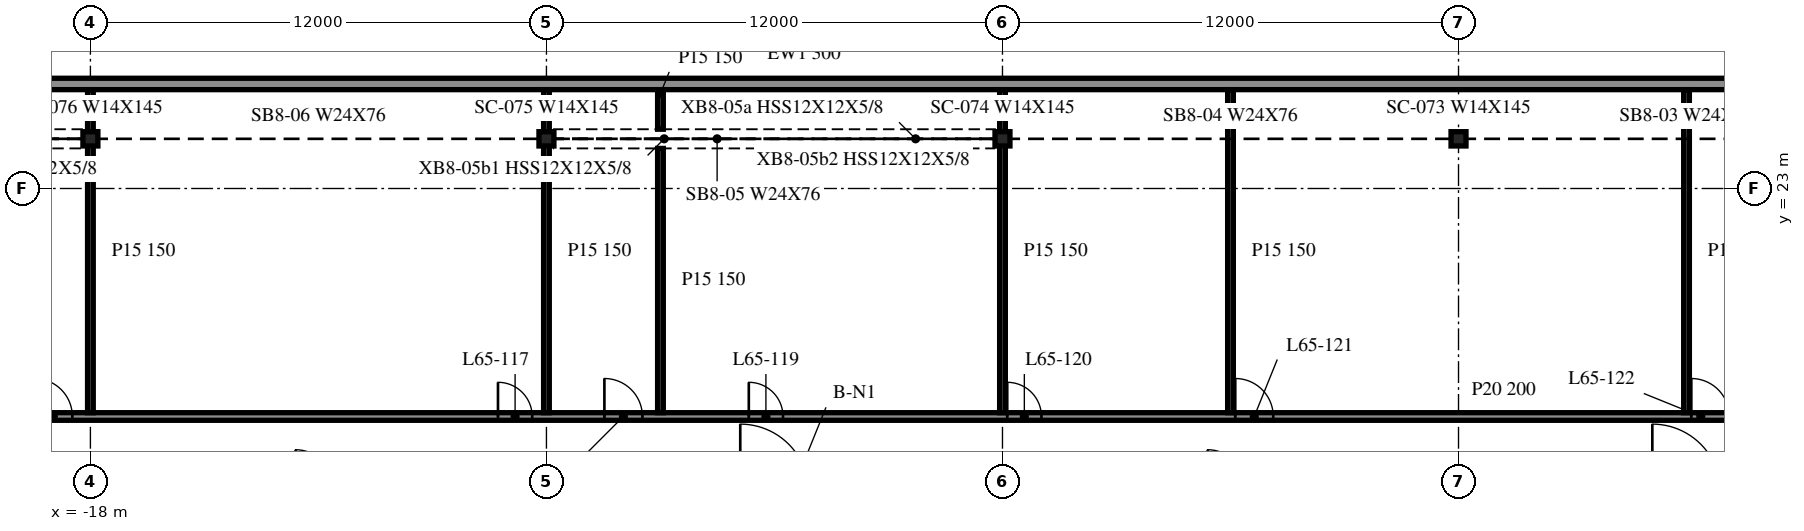
"""IFC4 building model, lengths in metres.
Left out: names, types, materials, properties, quantities, classifications, styles, units other than length and angle.
Written with IfcOpenShell. Run it as: python <this file> out.ifc"""

import sys

from ifc_helpers import new_model, si_unit, direction, frame, frame_2d, origin, origin_2d, place, context, subcontext, project, spatial, rectangle, i_section, extrude, element, fill, save


model = new_model("IFC4")
c1 = context("Model", 3, precision=1e-05, world=origin(), true_north=direction((0.0, 1.0)))
c2 = subcontext(c1, "Body", "Model", "MODEL_VIEW")
j1 = project(units=[si_unit("LENGTHUNIT", "METRE"), si_unit("PLANEANGLEUNIT", "RADIAN")], contexts=[c1])
p1 = place(None, origin())
s1 = spatial("IfcSite", under=j1, at=p1, CompositionType="ELEMENT")
p2 = place(p1, origin())
s2 = spatial("IfcBuilding", under=s1, at=p2, CompositionType="ELEMENT")
p3 = place(p2, frame((0.0, 0.0, 267.1)))
s3 = spatial("IfcBuildingStorey", under=s2, at=p3, CompositionType="ELEMENT", Elevation=267.1)
for number, where, z_axis, x_axis in (
    (1, (18.0, 24.307, -0.34), (0.0, 0.0, 1.0), (1.0, 0.0, 0.0)),
    (2, (6.0, 24.307, -0.34), (0.0, 0.0, 1.0), (1.0, 0.0, 0.0)),
    (3, (-6.0, 24.307, -0.34), (0.0, 0.0, 1.0), (1.0, 0.0, 0.0)),
    (4, (-18.0, 24.307, -0.34), (0.0, 0.0, 1.0), (1.0, 0.0, 0.0)),
):
    element("IfcColumn", number, at=place(p3, frame(where, z_axis=z_axis, x_axis=x_axis)), inside=s3, PredefinedType="COLUMN", context=c2, shape_type="SweptSolid", body=[
        extrude(i_section(OverallWidth=0.394, OverallDepth=0.376, WebThickness=0.017, FlangeThickness=0.028, at=origin_2d()), origin(), (0.0, 0.0, 1.0), 3.8),
    ])
p4 = place(p3, frame((42.0, 25.751, 0.0), z_axis=(0.0, 0.0, 1.0), x_axis=(-1.0, 0.0, 0.0)))
e5 = element("IfcWall", 5, at=p4, inside=s3, PredefinedType="NOTDEFINED", context=c2, shape_type="SweptSolid", body=[
    extrude(rectangle(XDim=84.0, YDim=0.3, at=frame_2d((42.0, 0.0))), origin(), (0.0, 0.0, 1.0), 2.853),
])
p5 = place(p3, frame((-47.975, 17.0, 0.0), z_axis=(0.0, 0.0, 1.0), x_axis=(1.0, 0.0, 0.0)))
e6 = element("IfcWall", 6, at=p5, inside=s3, PredefinedType="PARTITIONING", context=c2, shape_type="SweptSolid", body=[
    extrude(rectangle(XDim=95.95, YDim=0.2, at=frame_2d((47.975, 0.0))), origin(), (0.0, 0.0, 1.0), 3.46),
])
p6 = place(p5, frame((10.7, 0.0, 0.0)))
e7 = element("IfcOpeningElement", 7, at=p6, cuts=e6, PredefinedType="OPENING", context=c2, shape_type="SweptSolid", body=[
    extrude(rectangle(XDim=0.9, YDim=2.1, at=frame_2d((0.45, 1.05))), frame((0.0, 0.11, 0.0), z_axis=(0.0, -1.0, 0.0), x_axis=(1.0, 0.0, 0.0)), (0.0, 0.0, 1.0), 0.22),
])
p7 = place(p5, frame((13.7, 0.0, 0.0)))
e8 = element("IfcOpeningElement", 8, at=p7, cuts=e6, PredefinedType="OPENING", context=c2, shape_type="SweptSolid", body=[
    extrude(rectangle(XDim=0.9, YDim=2.1, at=frame_2d((0.45, 1.05))), frame((0.0, 0.11, 0.0), z_axis=(0.0, -1.0, 0.0), x_axis=(1.0, 0.0, 0.0)), (0.0, 0.0, 1.0), 0.22),
])
p8 = place(p5, frame((22.5, 0.0, 0.0)))
e9 = element("IfcOpeningElement", 9, at=p8, cuts=e6, PredefinedType="OPENING", context=c2, shape_type="SweptSolid", body=[
    extrude(rectangle(XDim=1.0, YDim=2.1, at=frame_2d((0.5, 1.05))), frame((0.0, 0.11, 0.0), z_axis=(0.0, -1.0, 0.0), x_axis=(1.0, 0.0, 0.0)), (0.0, 0.0, 1.0), 0.22),
])
p9 = place(p5, frame((28.5, 0.0, 0.0)))
e10 = element("IfcOpeningElement", 10, at=p9, cuts=e6, PredefinedType="OPENING", context=c2, shape_type="SweptSolid", body=[
    extrude(rectangle(XDim=1.0, YDim=2.1, at=frame_2d((0.5, 1.05))), frame((0.0, 0.11, 0.0), z_axis=(0.0, -1.0, 0.0), x_axis=(1.0, 0.0, 0.0)), (0.0, 0.0, 1.0), 0.22),
])
p10 = place(p5, frame((40.7, 0.0, 0.0)))
e11 = element("IfcOpeningElement", 11, at=p10, cuts=e6, PredefinedType="OPENING", context=c2, shape_type="SweptSolid", body=[
    extrude(rectangle(XDim=0.9, YDim=2.1, at=frame_2d((0.45, 1.05))), frame((0.0, 0.11, 0.0), z_axis=(0.0, -1.0, 0.0), x_axis=(1.0, 0.0, 0.0)), (0.0, 0.0, 1.0), 0.22),
])
p11 = place(p5, frame((43.5, 0.0, 0.0)))
e12 = element("IfcOpeningElement", 12, at=p11, cuts=e6, PredefinedType="OPENING", context=c2, shape_type="SweptSolid", body=[
    extrude(rectangle(XDim=1.0, YDim=2.1, at=frame_2d((0.5, 1.05))), frame((0.0, 0.11, 0.0), z_axis=(0.0, -1.0, 0.0), x_axis=(1.0, 0.0, 0.0)), (0.0, 0.0, 1.0), 0.22),
])
p12 = place(p5, frame((47.3, 0.0, 0.0)))
e13 = element("IfcOpeningElement", 13, at=p12, cuts=e6, PredefinedType="OPENING", context=c2, shape_type="SweptSolid", body=[
    extrude(rectangle(XDim=0.9, YDim=2.1, at=frame_2d((0.45, 1.05))), frame((0.0, 0.11, 0.0), z_axis=(0.0, -1.0, 0.0), x_axis=(1.0, 0.0, 0.0)), (0.0, 0.0, 1.0), 0.22),
])
p13 = place(p5, frame((54.1, 0.0, 0.0)))
e14 = element("IfcOpeningElement", 14, at=p13, cuts=e6, PredefinedType="OPENING", context=c2, shape_type="SweptSolid", body=[
    extrude(rectangle(XDim=0.9, YDim=2.1, at=frame_2d((0.45, 1.05))), frame((0.0, 0.11, 0.0), z_axis=(0.0, -1.0, 0.0), x_axis=(1.0, 0.0, 0.0)), (0.0, 0.0, 1.0), 0.22),
])
p14 = place(p5, frame((60.1, 0.0, 0.0)))
e15 = element("IfcOpeningElement", 15, at=p14, cuts=e6, PredefinedType="OPENING", context=c2, shape_type="SweptSolid", body=[
    extrude(rectangle(XDim=1.0, YDim=2.1, at=frame_2d((0.5, 1.05))), frame((0.0, 0.11, 0.0), z_axis=(0.0, -1.0, 0.0), x_axis=(1.0, 0.0, 0.0)), (0.0, 0.0, 1.0), 0.22),
])
p15 = place(p5, frame((72.1, 0.0, 0.0)))
e16 = element("IfcOpeningElement", 16, at=p15, cuts=e6, PredefinedType="OPENING", context=c2, shape_type="SweptSolid", body=[
    extrude(rectangle(XDim=1.0, YDim=2.1, at=frame_2d((0.5, 1.05))), frame((0.0, 0.11, 0.0), z_axis=(0.0, -1.0, 0.0), x_axis=(1.0, 0.0, 0.0)), (0.0, 0.0, 1.0), 0.22),
])
p16 = place(p5, frame((75.1, 0.0, 0.0)))
e17 = element("IfcOpeningElement", 17, at=p16, cuts=e6, PredefinedType="OPENING", context=c2, shape_type="SweptSolid", body=[
    extrude(rectangle(XDim=0.9, YDim=2.1, at=frame_2d((0.45, 1.05))), frame((0.0, 0.11, 0.0), z_axis=(0.0, -1.0, 0.0), x_axis=(1.0, 0.0, 0.0)), (0.0, 0.0, 1.0), 0.22),
])
p17 = place(p5, frame((84.1, 0.0, 0.0)))
e18 = element("IfcOpeningElement", 18, at=p17, cuts=e6, PredefinedType="OPENING", context=c2, shape_type="SweptSolid", body=[
    extrude(rectangle(XDim=1.0, YDim=2.1, at=frame_2d((0.5, 1.05))), frame((0.0, 0.11, 0.0), z_axis=(0.0, -1.0, 0.0), x_axis=(1.0, 0.0, 0.0)), (0.0, 0.0, 1.0), 0.22),
])
p18 = place(p5, frame((90.1, 0.0, 0.0)))
e19 = element("IfcOpeningElement", 19, at=p18, cuts=e6, PredefinedType="OPENING", context=c2, shape_type="SweptSolid", body=[
    extrude(rectangle(XDim=0.9, YDim=2.1, at=frame_2d((0.45, 1.05))), frame((0.0, 0.11, 0.0), z_axis=(0.0, -1.0, 0.0), x_axis=(1.0, 0.0, 0.0)), (0.0, 0.0, 1.0), 0.22),
])
for number, where, z_axis, x_axis in (
    (20, (-18.0, 17.1, 0.0), (0.0, 0.0, 1.0), (0.0, 1.0, 0.0)),
    (21, (-6.0, 17.1, 0.0), (0.0, 0.0, 1.0), (0.0, 1.0, 0.0)),
):
    element("IfcWall", number, at=place(p3, frame(where, z_axis=z_axis, x_axis=x_axis)), inside=s3, PredefinedType="PARTITIONING", context=c2, shape_type="SweptSolid", body=[
        extrude(rectangle(XDim=8.501, YDim=0.15, at=frame_2d((4.25, 0.0))), origin(), (0.0, 0.0, 1.0), 3.46),
    ])
p19 = place(p3, frame((-3.0, 17.1, 0.0), z_axis=(0.0, 0.0, 1.0), x_axis=(0.0, 1.0, 0.0)))
e22 = element("IfcWall", 22, at=p19, inside=s3, PredefinedType="PARTITIONING", context=c2, shape_type="SweptSolid", body=[
    extrude(rectangle(XDim=6.955, YDim=0.15, at=frame_2d((3.477, 0.0))), origin(), (0.0, 0.0, 1.0), 3.46),
])
p20 = place(p3, frame((-3.0, 24.559, 0.0), z_axis=(0.0, 0.0, 1.0), x_axis=(0.0, 1.0, 0.0)))
e23 = element("IfcWall", 23, at=p20, inside=s3, PredefinedType="PARTITIONING", context=c2, shape_type="SweptSolid", body=[
    extrude(rectangle(XDim=1.042, YDim=0.15, at=frame_2d((0.521, 0.0))), origin(), (0.0, 0.0, 1.0), 3.46),
])
for number, where, z_axis, x_axis in (
    (24, (6.0, 17.1, 0.0), (0.0, 0.0, 1.0), (0.0, 1.0, 0.0)),
    (25, (12.0, 17.1, 0.0), (0.0, 0.0, 1.0), (0.0, 1.0, 0.0)),
    (26, (24.0, 17.1, 0.0), (0.0, 0.0, 1.0), (0.0, 1.0, 0.0)),
):
    element("IfcWall", number, at=place(p3, frame(where, z_axis=z_axis, x_axis=x_axis)), inside=s3, PredefinedType="PARTITIONING", context=c2, shape_type="SweptSolid", body=[
        extrude(rectangle(XDim=8.501, YDim=0.15, at=frame_2d((4.25, 0.0))), origin(), (0.0, 0.0, 1.0), 3.46),
    ])
p21 = place(p9, origin())
e27 = element("IfcDoor", 27, at=p21, inside=s3, OperationType="SINGLE_SWING_LEFT", PredefinedType="DOOR", context=c2, shape_type="SweptSolid", body=[
    extrude(rectangle(XDim=1.0, YDim=2.1, at=frame_2d((0.5, 1.05))), frame((0.0, 0.025, 0.0), z_axis=(0.0, -1.0, 0.0), x_axis=(1.0, 0.0, 0.0)), (0.0, 0.0, 1.0), 0.05),
])
fill(e10, e27)
p22 = place(p10, origin())
e28 = element("IfcDoor", 28, at=p22, inside=s3, OperationType="SINGLE_SWING_LEFT", PredefinedType="DOOR", context=c2, shape_type="SweptSolid", body=[
    extrude(rectangle(XDim=0.9, YDim=2.1, at=frame_2d((0.45, 1.05))), frame((0.0, 0.025, 0.0), z_axis=(0.0, -1.0, 0.0), x_axis=(1.0, 0.0, 0.0)), (0.0, 0.0, 1.0), 0.05),
])
fill(e11, e28)
p23 = place(p11, origin())
e29 = element("IfcDoor", 29, at=p23, inside=s3, OperationType="SINGLE_SWING_LEFT", PredefinedType="DOOR", context=c2, shape_type="SweptSolid", body=[
    extrude(rectangle(XDim=1.0, YDim=2.1, at=frame_2d((0.5, 1.05))), frame((0.0, 0.025, 0.0), z_axis=(0.0, -1.0, 0.0), x_axis=(1.0, 0.0, 0.0)), (0.0, 0.0, 1.0), 0.05),
])
fill(e12, e29)
p24 = place(p12, origin())
e30 = element("IfcDoor", 30, at=p24, inside=s3, OperationType="SINGLE_SWING_LEFT", PredefinedType="DOOR", context=c2, shape_type="SweptSolid", body=[
    extrude(rectangle(XDim=0.9, YDim=2.1, at=frame_2d((0.45, 1.05))), frame((0.0, 0.025, 0.0), z_axis=(0.0, -1.0, 0.0), x_axis=(1.0, 0.0, 0.0)), (0.0, 0.0, 1.0), 0.05),
])
fill(e13, e30)
p25 = place(p13, origin())
e31 = element("IfcDoor", 31, at=p25, inside=s3, OperationType="SINGLE_SWING_RIGHT", PredefinedType="DOOR", context=c2, shape_type="SweptSolid", body=[
    extrude(rectangle(XDim=0.9, YDim=2.1, at=frame_2d((0.45, 1.05))), frame((0.0, 0.025, 0.0), z_axis=(0.0, -1.0, 0.0), x_axis=(1.0, 0.0, 0.0)), (0.0, 0.0, 1.0), 0.05),
])
fill(e14, e31)
p26 = place(p14, origin())
e32 = element("IfcDoor", 32, at=p26, inside=s3, OperationType="SINGLE_SWING_RIGHT", PredefinedType="DOOR", context=c2, shape_type="SweptSolid", body=[
    extrude(rectangle(XDim=1.0, YDim=2.1, at=frame_2d((0.5, 1.05))), frame((0.0, 0.025, 0.0), z_axis=(0.0, -1.0, 0.0), x_axis=(1.0, 0.0, 0.0)), (0.0, 0.0, 1.0), 0.05),
])
fill(e15, e32)
p27 = place(p15, origin())
e33 = element("IfcDoor", 33, at=p27, inside=s3, OperationType="SINGLE_SWING_RIGHT", PredefinedType="DOOR", context=c2, shape_type="SweptSolid", body=[
    extrude(rectangle(XDim=1.0, YDim=2.1, at=frame_2d((0.5, 1.05))), frame((0.0, 0.025, 0.0), z_axis=(0.0, -1.0, 0.0), x_axis=(1.0, 0.0, 0.0)), (0.0, 0.0, 1.0), 0.05),
])
fill(e16, e33)
save(model, sys.argv[1])
